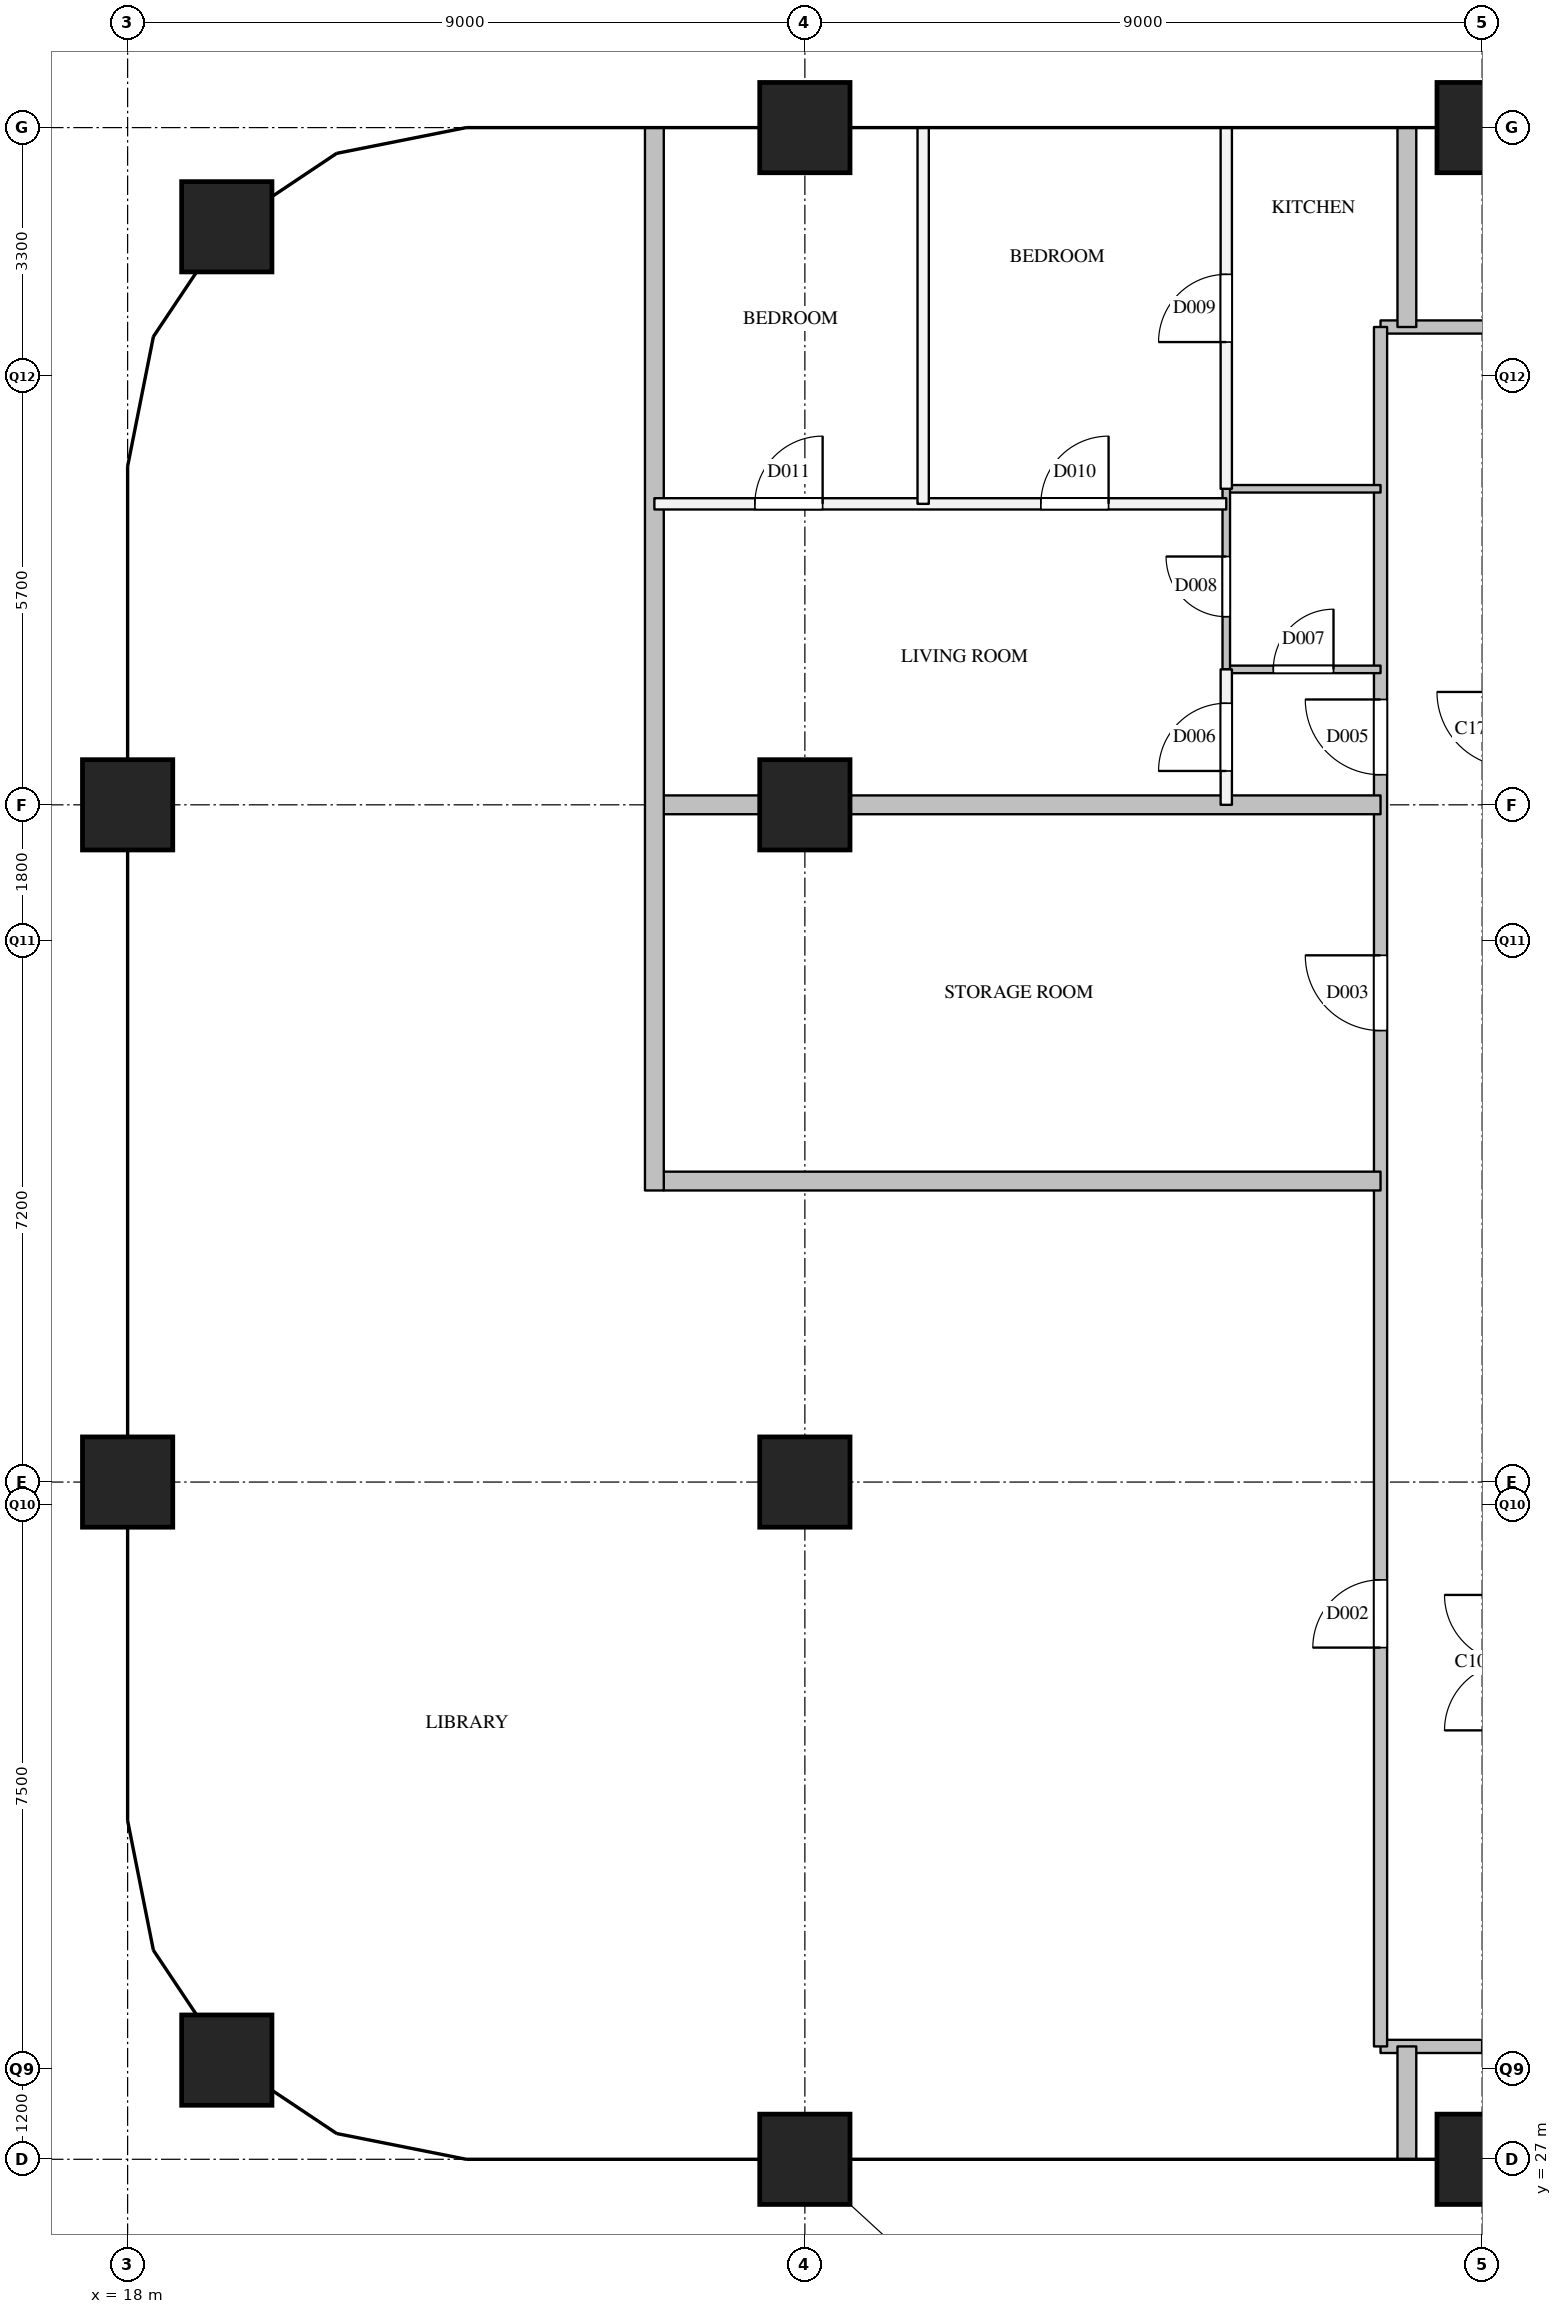
"""IFC4 building model, lengths in metres.
Left out: names, types, materials, properties, quantities, classifications, styles, units other than length and angle.
Written with IfcOpenShell. Run it as: python <this file> out.ifc"""

import sys

from ifc_helpers import new_model, si_unit, direction, frame, frame_2d, origin, origin_2d, place, context, subcontext, project, spatial, rectangle, extrude, element, fill, save


model = new_model("IFC4")
c1 = context("Model", 3, precision=1e-05, world=origin(), true_north=direction((0.0, 1.0)))
c2 = subcontext(c1, "Body", "Model", "MODEL_VIEW")
j1 = project(units=[si_unit("LENGTHUNIT", "METRE"), si_unit("PLANEANGLEUNIT", "RADIAN")], contexts=[c1])
p1 = place(None, origin())
s1 = spatial("IfcSite", under=j1, at=p1, CompositionType="ELEMENT")
p2 = place(p1, origin())
s2 = spatial("IfcBuilding", under=s1, at=p2, CompositionType="ELEMENT")
p3 = place(p2, frame((0.0, 0.0, 265.7)))
s3 = spatial("IfcBuildingStorey", under=s2, at=p3, CompositionType="ELEMENT", Elevation=265.7)
for number, where, z_axis, x_axis in (
    (1, (19.318, 28.318, 0.0), (0.0, 0.0, 1.0), (1.0, 0.0, 0.0)),
    (2, (18.0, 36.0, 0.0), (0.0, 0.0, 1.0), (1.0, 0.0, 0.0)),
    (3, (18.0, 45.0, 0.0), (0.0, 0.0, 1.0), (1.0, 0.0, 0.0)),
    (4, (19.318, 52.682, 0.0), (0.0, 0.0, 1.0), (1.0, 0.0, 0.0)),
    (5, (27.0, 27.0, 0.0), (0.0, 0.0, 1.0), (1.0, 0.0, 0.0)),
    (6, (27.0, 36.0, 0.0), (0.0, 0.0, 1.0), (1.0, 0.0, 0.0)),
    (7, (27.0, 45.0, 0.0), (0.0, 0.0, 1.0), (1.0, 0.0, 0.0)),
    (8, (27.0, 54.0, 0.0), (0.0, 0.0, 1.0), (1.0, 0.0, 0.0)),
    (9, (36.0, 27.0, 0.0), (0.0, 0.0, 1.0), (1.0, 0.0, 0.0)),
    (10, (36.0, 54.0, 0.0), (0.0, 0.0, 1.0), (1.0, 0.0, 0.0)),
):
    element("IfcColumn", number, at=place(p3, frame(where, z_axis=z_axis, x_axis=x_axis)), inside=s3, PredefinedType="COLUMN", context=c2, shape_type="SweptSolid", body=[
        extrude(rectangle(XDim=1.2, YDim=1.2, at=origin_2d()), origin(), (0.0, 0.0, 1.0), 3.9),
    ])
p4 = place(p3, frame((34.65, 28.5, 0.0), z_axis=(0.0, 0.0, 1.0), x_axis=(1.0, 0.0, 0.0)))
e11 = element("IfcWall", 11, at=p4, inside=s3, PredefinedType="PARTITIONING", context=c2, shape_type="SweptSolid", body=[
    extrude(rectangle(XDim=1.35, YDim=0.175, at=frame_2d((0.675, 0.0))), origin(), (0.0, 0.0, 1.0), 3.6),
])
p5 = place(p3, frame((34.65, 51.35, 0.0), z_axis=(0.0, 0.0, 1.0), x_axis=(1.0, 0.0, 0.0)))
e12 = element("IfcWall", 12, at=p5, inside=s3, PredefinedType="PARTITIONING", context=c2, shape_type="SweptSolid", body=[
    extrude(rectangle(XDim=15.1, YDim=0.175, at=frame_2d((7.55, 0.0))), origin(), (0.0, 0.0, 1.0), 3.6),
])
p6 = place(p5, frame((2.4, 0.0, 0.0)))
e13 = element("IfcOpeningElement", 13, at=p6, cuts=e12, PredefinedType="OPENING", context=c2, shape_type="SweptSolid", body=[
    extrude(rectangle(XDim=0.9, YDim=2.1, at=frame_2d((0.45, 1.05))), frame((0.0, 0.097, 0.0), z_axis=(0.0, -1.0, 0.0), x_axis=(1.0, 0.0, 0.0)), (0.0, 0.0, 1.0), 0.195),
])
p7 = place(p5, frame((7.35, 0.0, 0.0)))
e14 = element("IfcOpeningElement", 14, at=p7, cuts=e12, PredefinedType="OPENING", context=c2, shape_type="SweptSolid", body=[
    extrude(rectangle(XDim=1.0, YDim=2.1, at=frame_2d((0.5, 1.05))), frame((0.0, 0.097, 0.0), z_axis=(0.0, -1.0, 0.0), x_axis=(1.0, 0.0, 0.0)), (0.0, 0.0, 1.0), 0.195),
])
p8 = place(p3, frame((34.65, 28.5, 0.0), z_axis=(0.0, 0.0, 1.0), x_axis=(0.0, 1.0, 0.0)))
e15 = element("IfcWall", 15, at=p8, inside=s3, PredefinedType="PARTITIONING", context=c2, shape_type="SweptSolid", body=[
    extrude(rectangle(XDim=22.85, YDim=0.175, at=frame_2d((11.425, 0.0))), origin(), (0.0, 0.0, 1.0), 3.6),
])
p9 = place(p8, frame((5.3, 0.0, 0.0)))
e16 = element("IfcOpeningElement", 16, at=p9, cuts=e15, PredefinedType="OPENING", context=c2, shape_type="SweptSolid", body=[
    extrude(rectangle(XDim=0.9, YDim=2.1, at=frame_2d((0.45, 1.05))), frame((0.0, 0.097, 0.0), z_axis=(0.0, -1.0, 0.0), x_axis=(1.0, 0.0, 0.0)), (0.0, 0.0, 1.0), 0.195),
])
p10 = place(p8, frame((13.5, 0.0, 0.0)))
e17 = element("IfcOpeningElement", 17, at=p10, cuts=e15, PredefinedType="OPENING", context=c2, shape_type="SweptSolid", body=[
    extrude(rectangle(XDim=1.0, YDim=2.1, at=frame_2d((0.5, 1.05))), frame((0.0, 0.097, 0.0), z_axis=(0.0, -1.0, 0.0), x_axis=(1.0, 0.0, 0.0)), (0.0, 0.0, 1.0), 0.195),
])
p11 = place(p8, frame((16.9, 0.0, 0.0)))
e18 = element("IfcOpeningElement", 18, at=p11, cuts=e15, PredefinedType="OPENING", context=c2, shape_type="SweptSolid", body=[
    extrude(rectangle(XDim=1.0, YDim=2.1, at=frame_2d((0.5, 1.05))), frame((0.0, 0.097, 0.0), z_axis=(0.0, -1.0, 0.0), x_axis=(1.0, 0.0, 0.0)), (0.0, 0.0, 1.0), 0.195),
])
p12 = place(p3, frame((25.0, 49.0, 0.0), z_axis=(0.0, 0.0, 1.0), x_axis=(1.0, 0.0, 0.0)))
e19 = element("IfcWall", 19, at=p12, inside=s3, PredefinedType="PARTITIONING", context=c2, shape_type="SweptSolid", body=[
    extrude(rectangle(XDim=7.6, YDim=0.15, at=frame_2d((3.8, 0.0))), origin(), (0.0, 0.0, 1.0), 2.6),
])
p13 = place(p12, frame((5.136, 0.0, 0.0)))
e20 = element("IfcOpeningElement", 20, at=p13, cuts=e19, PredefinedType="OPENING", context=c2, shape_type="SweptSolid", body=[
    extrude(rectangle(XDim=0.9, YDim=2.1, at=frame_2d((0.45, 1.05))), frame((0.0, 0.085, 0.0), z_axis=(0.0, -1.0, 0.0), x_axis=(1.0, 0.0, 0.0)), (0.0, 0.0, 1.0), 0.17),
])
p14 = place(p12, frame((1.336, 0.0, 0.0)))
e21 = element("IfcOpeningElement", 21, at=p14, cuts=e19, PredefinedType="OPENING", context=c2, shape_type="SweptSolid", body=[
    extrude(rectangle(XDim=0.9, YDim=2.1, at=frame_2d((0.45, 1.05))), frame((0.0, 0.085, 0.0), z_axis=(0.0, -1.0, 0.0), x_axis=(1.0, 0.0, 0.0)), (0.0, 0.0, 1.0), 0.17),
])
p15 = place(p3, frame((28.572, 49.0, 0.0), z_axis=(0.0, 0.0, 1.0), x_axis=(0.0, 1.0, 0.0)))
e22 = element("IfcWall", 22, at=p15, inside=s3, PredefinedType="PARTITIONING", context=c2, shape_type="SweptSolid", body=[
    extrude(rectangle(XDim=5.0, YDim=0.15, at=frame_2d((2.5, 0.0))), origin(), (0.0, 0.0, 1.0), 2.6),
])
p16 = place(p3, frame((32.6, 45.0, 0.0), z_axis=(0.0, 0.0, 1.0), x_axis=(0.0, 1.0, 0.0)))
e23 = element("IfcWall", 23, at=p16, inside=s3, PredefinedType="PARTITIONING", context=c2, shape_type="SweptSolid", body=[
    extrude(rectangle(XDim=1.8, YDim=0.15, at=frame_2d((0.9, 0.0))), origin(), (0.0, 0.0, 1.0), 3.6),
])
p17 = place(p16, frame((0.45, 0.0, 0.0)))
e24 = element("IfcOpeningElement", 24, at=p17, cuts=e23, PredefinedType="OPENING", context=c2, shape_type="SweptSolid", body=[
    extrude(rectangle(XDim=0.9, YDim=2.1, at=frame_2d((0.45, 1.05))), frame((0.0, 0.085, 0.0), z_axis=(0.0, -1.0, 0.0), x_axis=(1.0, 0.0, 0.0)), (0.0, 0.0, 1.0), 0.17),
])
p18 = place(p3, frame((32.6, 49.2, 0.0), z_axis=(0.0, 0.0, 1.0), x_axis=(0.0, 1.0, 0.0)))
e25 = element("IfcWall", 25, at=p18, inside=s3, PredefinedType="PARTITIONING", context=c2, shape_type="SweptSolid", body=[
    extrude(rectangle(XDim=4.8, YDim=0.15, at=frame_2d((2.4, 0.0))), origin(), (0.0, 0.0, 1.0), 2.6),
])
p19 = place(p18, frame((1.95, 0.0, 0.0)))
e26 = element("IfcOpeningElement", 26, at=p19, cuts=e25, PredefinedType="OPENING", context=c2, shape_type="SweptSolid", body=[
    extrude(rectangle(XDim=0.9, YDim=2.1, at=frame_2d((0.45, 1.05))), frame((0.0, 0.085, 0.0), z_axis=(0.0, -1.0, 0.0), x_axis=(1.0, 0.0, 0.0)), (0.0, 0.0, 1.0), 0.17),
])
p20 = place(p3, frame((25.125, 40.0, 0.0), z_axis=(0.0, 0.0, 1.0), x_axis=(1.0, 0.0, 0.0)))
e27 = element("IfcWall", 27, at=p20, inside=s3, PredefinedType="PARTITIONING", context=c2, shape_type="SweptSolid", body=[
    extrude(rectangle(XDim=9.525, YDim=0.25, at=frame_2d((4.762, 0.0))), origin(), (0.0, 0.0, 1.0), 2.6),
])
p21 = place(p3, frame((25.0, 45.0, 0.0), z_axis=(0.0, 0.0, 1.0), x_axis=(1.0, 0.0, 0.0)))
e28 = element("IfcWall", 28, at=p21, inside=s3, PredefinedType="PARTITIONING", context=c2, shape_type="SweptSolid", body=[
    extrude(rectangle(XDim=9.65, YDim=0.25, at=frame_2d((4.825, 0.0))), origin(), (0.0, 0.0, 1.0), 3.6),
])
p22 = place(p3, frame((25.0, 39.875, 0.0), z_axis=(0.0, 0.0, 1.0), x_axis=(0.0, 1.0, 0.0)))
e29 = element("IfcWall", 29, at=p22, inside=s3, PredefinedType="PARTITIONING", context=c2, shape_type="SweptSolid", body=[
    extrude(rectangle(XDim=14.125, YDim=0.25, at=frame_2d((7.062, 0.0))), origin(), (0.0, 0.0, 1.0), 2.6),
])
p23 = place(p3, frame((35.0, 27.0, 0.0), z_axis=(0.0, 0.0, 1.0), x_axis=(0.0, 1.0, 0.0)))
e30 = element("IfcWall", 30, at=p23, inside=s3, PredefinedType="PARTITIONING", context=c2, shape_type="SweptSolid", body=[
    extrude(rectangle(XDim=1.5, YDim=0.25, at=frame_2d((0.75, 0.0))), origin(), (0.0, 0.0, 1.0), 2.6),
])
p24 = place(p3, frame((35.0, 51.35, 0.0), z_axis=(0.0, 0.0, 1.0), x_axis=(0.0, 1.0, 0.0)))
e31 = element("IfcWall", 31, at=p24, inside=s3, PredefinedType="PARTITIONING", context=c2, shape_type="SweptSolid", body=[
    extrude(rectangle(XDim=2.65, YDim=0.25, at=frame_2d((1.325, 0.0))), origin(), (0.0, 0.0, 1.0), 2.6),
])
p25 = place(p3, frame((32.6, 46.8, 0.0), z_axis=(0.0, 0.0, 1.0), x_axis=(1.0, 0.0, 0.0)))
e32 = element("IfcWall", 32, at=p25, inside=s3, PredefinedType="PARTITIONING", context=c2, shape_type="SweptSolid", body=[
    extrude(rectangle(XDim=2.05, YDim=0.1, at=frame_2d((1.025, 0.0))), origin(), (0.0, 0.0, 1.0), 3.6),
])
p26 = place(p25, frame((0.625, 0.0, 0.0)))
e33 = element("IfcOpeningElement", 33, at=p26, cuts=e32, PredefinedType="OPENING", context=c2, shape_type="SweptSolid", body=[
    extrude(rectangle(XDim=0.8, YDim=2.1, at=frame_2d((0.4, 1.05))), frame((0.0, 0.06, 0.0), z_axis=(0.0, -1.0, 0.0), x_axis=(1.0, 0.0, 0.0)), (0.0, 0.0, 1.0), 0.12),
])
p27 = place(p3, frame((32.6, 49.2, 0.0), z_axis=(0.0, 0.0, 1.0), x_axis=(1.0, 0.0, 0.0)))
e34 = element("IfcWall", 34, at=p27, inside=s3, PredefinedType="PARTITIONING", context=c2, shape_type="SweptSolid", body=[
    extrude(rectangle(XDim=2.05, YDim=0.1, at=frame_2d((1.025, 0.0))), origin(), (0.0, 0.0, 1.0), 3.6),
])
p28 = place(p3, frame((32.6, 46.8, 0.0), z_axis=(0.0, 0.0, 1.0), x_axis=(0.0, 1.0, 0.0)))
e35 = element("IfcWall", 35, at=p28, inside=s3, PredefinedType="PARTITIONING", context=c2, shape_type="SweptSolid", body=[
    extrude(rectangle(XDim=2.4, YDim=0.1, at=frame_2d((1.2, 0.0))), origin(), (0.0, 0.0, 1.0), 3.6),
])
p29 = place(p28, frame((0.7, 0.0, 0.0)))
e36 = element("IfcOpeningElement", 36, at=p29, cuts=e35, PredefinedType="OPENING", context=c2, shape_type="SweptSolid", body=[
    extrude(rectangle(XDim=0.8, YDim=2.1, at=frame_2d((0.4, 1.05))), frame((0.0, 0.06, 0.0), z_axis=(0.0, -1.0, 0.0), x_axis=(1.0, 0.0, 0.0)), (0.0, 0.0, 1.0), 0.12),
])
p30 = place(p9, origin())
e37 = element("IfcDoor", 37, at=p30, inside=s3, OperationType="SINGLE_SWING_LEFT", PredefinedType="DOOR", context=c2, shape_type="SweptSolid", body=[
    extrude(rectangle(XDim=0.9, YDim=2.1, at=frame_2d((0.45, 1.05))), frame((0.0, 0.025, 0.0), z_axis=(0.0, -1.0, 0.0), x_axis=(1.0, 0.0, 0.0)), (0.0, 0.0, 1.0), 0.05),
])
fill(e16, e37)
p31 = place(p10, origin())
e38 = element("IfcDoor", 38, at=p31, inside=s3, OperationType="SINGLE_SWING_RIGHT", PredefinedType="DOOR", context=c2, shape_type="SweptSolid", body=[
    extrude(rectangle(XDim=1.0, YDim=2.1, at=frame_2d((0.5, 1.05))), frame((0.0, 0.025, 0.0), z_axis=(0.0, -1.0, 0.0), x_axis=(1.0, 0.0, 0.0)), (0.0, 0.0, 1.0), 0.05),
])
fill(e17, e38)
p32 = place(p11, origin())
e39 = element("IfcDoor", 39, at=p32, inside=s3, OperationType="SINGLE_SWING_RIGHT", PredefinedType="DOOR", context=c2, shape_type="SweptSolid", body=[
    extrude(rectangle(XDim=1.0, YDim=2.1, at=frame_2d((0.5, 1.05))), frame((0.0, 0.025, 0.0), z_axis=(0.0, -1.0, 0.0), x_axis=(1.0, 0.0, 0.0)), (0.0, 0.0, 1.0), 0.05),
])
fill(e18, e39)
p33 = place(p17, origin())
e40 = element("IfcDoor", 40, at=p33, inside=s3, OperationType="SINGLE_SWING_LEFT", PredefinedType="DOOR", context=c2, shape_type="SweptSolid", body=[
    extrude(rectangle(XDim=0.9, YDim=2.1, at=frame_2d((0.45, 1.05))), frame((0.0, 0.025, 0.0), z_axis=(0.0, -1.0, 0.0), x_axis=(1.0, 0.0, 0.0)), (0.0, 0.0, 1.0), 0.05),
])
fill(e24, e40)
p34 = place(p26, origin())
e41 = element("IfcDoor", 41, at=p34, inside=s3, OperationType="SINGLE_SWING_RIGHT", PredefinedType="DOOR", context=c2, shape_type="SweptSolid", body=[
    extrude(rectangle(XDim=0.8, YDim=2.1, at=frame_2d((0.4, 1.05))), frame((0.0, 0.025, 0.0), z_axis=(0.0, -1.0, 0.0), x_axis=(1.0, 0.0, 0.0)), (0.0, 0.0, 1.0), 0.05),
])
fill(e33, e41)
p35 = place(p29, origin())
e42 = element("IfcDoor", 42, at=p35, inside=s3, OperationType="SINGLE_SWING_RIGHT", PredefinedType="DOOR", context=c2, shape_type="SweptSolid", body=[
    extrude(rectangle(XDim=0.8, YDim=2.1, at=frame_2d((0.4, 1.05))), frame((0.0, 0.025, 0.0), z_axis=(0.0, -1.0, 0.0), x_axis=(1.0, 0.0, 0.0)), (0.0, 0.0, 1.0), 0.05),
])
fill(e36, e42)
p36 = place(p19, origin())
e43 = element("IfcDoor", 43, at=p36, inside=s3, OperationType="SINGLE_SWING_LEFT", PredefinedType="DOOR", context=c2, shape_type="SweptSolid", body=[
    extrude(rectangle(XDim=0.9, YDim=2.1, at=frame_2d((0.45, 1.05))), frame((0.0, 0.025, 0.0), z_axis=(0.0, -1.0, 0.0), x_axis=(1.0, 0.0, 0.0)), (0.0, 0.0, 1.0), 0.05),
])
fill(e26, e43)
p37 = place(p13, origin())
e44 = element("IfcDoor", 44, at=p37, inside=s3, OperationType="SINGLE_SWING_RIGHT", PredefinedType="DOOR", context=c2, shape_type="SweptSolid", body=[
    extrude(rectangle(XDim=0.9, YDim=2.1, at=frame_2d((0.45, 1.05))), frame((0.0, 0.025, 0.0), z_axis=(0.0, -1.0, 0.0), x_axis=(1.0, 0.0, 0.0)), (0.0, 0.0, 1.0), 0.05),
])
fill(e20, e44)
p38 = place(p14, origin())
e45 = element("IfcDoor", 45, at=p38, inside=s3, OperationType="SINGLE_SWING_RIGHT", PredefinedType="DOOR", context=c2, shape_type="SweptSolid", body=[
    extrude(rectangle(XDim=0.9, YDim=2.1, at=frame_2d((0.45, 1.05))), frame((0.0, 0.025, 0.0), z_axis=(0.0, -1.0, 0.0), x_axis=(1.0, 0.0, 0.0)), (0.0, 0.0, 1.0), 0.05),
])
fill(e21, e45)
save(model, sys.argv[1])
